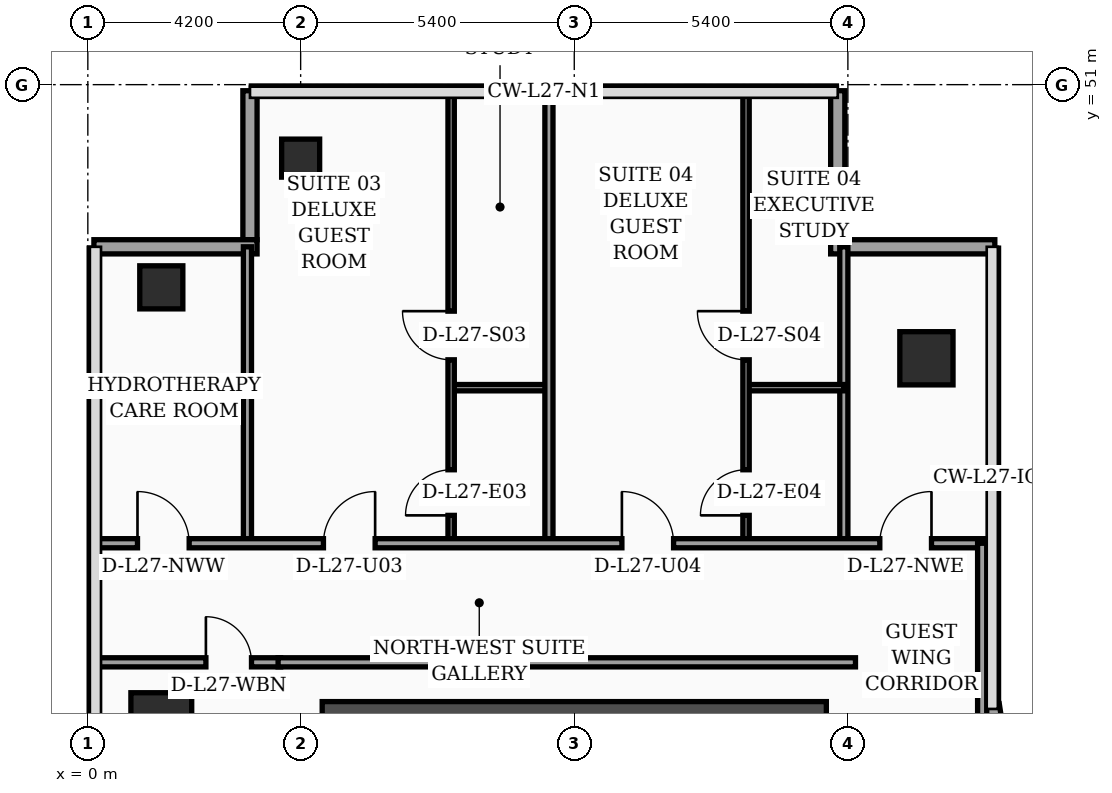
"""IFC4 building model, lengths in metres.
Left out: names, types, materials, properties, quantities, classifications, styles, units other than length and angle.
Written with IfcOpenShell. Run it as: python <this file> out.ifc"""

import sys

from ifc_helpers import new_model, si_unit, direction, frame, frame_2d, origin, origin_2d, place, context, subcontext, project, spatial, rectangle, hollow_rectangle, extrude, element, fill, save


model = new_model("IFC4")
c1 = context("Model", 3, precision=1e-05, world=origin(), true_north=direction((0.0, 1.0)))
c2 = subcontext(c1, "Body", "Model", "MODEL_VIEW")
j1 = project(units=[si_unit("LENGTHUNIT", "METRE"), si_unit("PLANEANGLEUNIT", "RADIAN")], contexts=[c1])
p1 = place(None, origin())
s1 = spatial("IfcSite", under=j1, at=p1, CompositionType="ELEMENT")
p2 = place(p1, origin())
s2 = spatial("IfcBuilding", under=s1, at=p2, CompositionType="ELEMENT")
p3 = place(p2, frame((0.0, 0.0, 112.6)))
s3 = spatial("IfcBuildingStorey", under=s2, at=p3, CompositionType="ELEMENT", Elevation=112.6)
p4 = place(p3, frame((4.625, 38.4, 0.0), z_axis=(0.0, 0.0, 1.0), x_axis=(1.0, 0.0, 0.0)))
e1 = element("IfcWall", 1, at=p4, inside=s3, PredefinedType="SHEAR", context=c2, shape_type="SweptSolid", body=[
    extrude(rectangle(XDim=9.95, YDim=0.85, at=frame_2d((4.975, 0.0))), origin(), (0.0, 0.0, 1.0), 3.56),
])
p5 = place(p3, frame((1.45, 38.4, 0.0), z_axis=(0.0, 0.0, 1.0), x_axis=(1.0, 0.0, 0.0)))
e2 = element("IfcColumn", 2, at=p5, inside=s3, PredefinedType="COLUMN", context=c2, shape_type="SweptSolid", body=[
    extrude(rectangle(XDim=1.2, YDim=1.2, at=origin_2d()), origin(), (0.0, 0.0, 1.0), 3.56),
])
p6 = place(p3, frame((1.45, 47.0, 0.0), z_axis=(0.0, 0.0, 1.0), x_axis=(1.0, 0.0, 0.0)))
e3 = element("IfcColumn", 3, at=p6, inside=s3, PredefinedType="COLUMN", context=c2, shape_type="SweptSolid", body=[
    extrude(hollow_rectangle(XDim=0.85, YDim=0.85, WallThickness=0.036, at=origin_2d()), origin(), (0.0, 0.0, 1.0), 3.56),
])
p7 = place(p3, frame((4.2, 49.55, 0.0), z_axis=(0.0, 0.0, 1.0), x_axis=(1.0, 0.0, 0.0)))
e4 = element("IfcColumn", 4, at=p7, inside=s3, PredefinedType="COLUMN", context=c2, shape_type="SweptSolid", body=[
    extrude(hollow_rectangle(XDim=0.75, YDim=0.75, WallThickness=0.032, at=origin_2d()), origin(), (0.0, 0.0, 1.0), 3.56),
])
p8 = place(p3, frame((16.55, 45.6, 0.0), z_axis=(0.0, 0.0, 1.0), x_axis=(1.0, 0.0, 0.0)))
e5 = element("IfcColumn", 5, at=p8, inside=s3, PredefinedType="COLUMN", context=c2, shape_type="SweptSolid", body=[
    extrude(rectangle(XDim=1.05, YDim=1.05, at=origin_2d()), origin(), (0.0, 0.0, 1.0), 3.56),
])
p9 = place(p3, frame((17.962, 38.03, 0.0), z_axis=(0.0, 0.0, 1.0), x_axis=(-0.15141125477, 0.988470855377, 0.0)))
e6 = element("IfcWall", 6, at=p9, inside=s3, PredefinedType="SOLIDWALL", context=c2, shape_type="SweptSolid", body=[
    extrude(rectangle(XDim=0.739, YDim=0.28, at=frame_2d((0.369, 0.0))), origin(), (0.0, 0.0, 1.0), 3.56),
])
p10 = place(p3, frame((17.9, 47.8, 0.0), z_axis=(0.0, 0.0, 1.0), x_axis=(-1.0, 0.0, 0.0)))
e7 = element("IfcWall", 7, at=p10, inside=s3, PredefinedType="SOLIDWALL", context=c2, shape_type="SweptSolid", body=[
    extrude(rectangle(XDim=3.24, YDim=0.28, at=frame_2d((1.62, 0.0))), origin(), (0.0, 0.0, 1.0), 3.56),
])
p11 = place(p3, frame((14.8, 47.94, 0.0), z_axis=(0.0, 0.0, 1.0), x_axis=(0.0, 1.0, 0.0)))
e8 = element("IfcWall", 8, at=p11, inside=s3, PredefinedType="SOLIDWALL", context=c2, shape_type="SweptSolid", body=[
    extrude(rectangle(XDim=2.94, YDim=0.28, at=frame_2d((1.47, 0.0))), origin(), (0.0, 0.0, 1.0), 3.56),
])
p12 = place(p3, frame((3.2, 50.88, 0.0), z_axis=(0.0, 0.0, 1.0), x_axis=(0.0, -1.0, 0.0)))
e9 = element("IfcWall", 9, at=p12, inside=s3, PredefinedType="SOLIDWALL", context=c2, shape_type="SweptSolid", body=[
    extrude(rectangle(XDim=2.94, YDim=0.28, at=frame_2d((1.47, 0.0))), origin(), (0.0, 0.0, 1.0), 3.04),
])
p13 = place(p3, frame((3.34, 47.8, 0.0), z_axis=(0.0, 0.0, 1.0), x_axis=(-1.0, 0.0, 0.0)))
e10 = element("IfcWall", 10, at=p13, inside=s3, PredefinedType="SOLIDWALL", context=c2, shape_type="SweptSolid", body=[
    extrude(rectangle(XDim=3.22, YDim=0.28, at=frame_2d((1.61, 0.0))), origin(), (0.0, 0.0, 1.0), 3.04),
])
p14 = place(p3, frame((0.08, 39.6, 0.0), z_axis=(0.0, 0.0, 1.0), x_axis=(1.0, 0.0, 0.0)))
e11 = element("IfcWall", 11, at=p14, inside=s3, PredefinedType="PARTITIONING", context=c2, shape_type="SweptSolid", body=[
    extrude(rectangle(XDim=3.725, YDim=0.18, at=frame_2d((1.862, 0.0))), origin(), (0.0, 0.0, 1.0), 2.84),
])
p15 = place(p14, frame((2.25, 0.0, 0.0)))
e12 = element("IfcOpeningElement", 12, at=p15, cuts=e11, PredefinedType="OPENING", context=c2, shape_type="SweptSolid", body=[
    extrude(rectangle(XDim=0.9, YDim=2.15, at=frame_2d((0.45, 1.075))), frame((0.0, 0.1, 0.0), z_axis=(0.0, -1.0, 0.0), x_axis=(1.0, 0.0, 0.0)), (0.0, 0.0, 1.0), 0.2),
])
p16 = place(p3, frame((3.15, 41.95, 0.0), z_axis=(0.0, 0.0, 1.0), x_axis=(0.0, 1.0, 0.0)))
e13 = element("IfcWall", 13, at=p16, inside=s3, PredefinedType="PARTITIONING", context=c2, shape_type="SweptSolid", body=[
    extrude(rectangle(XDim=5.85, YDim=0.16, at=frame_2d((2.925, 0.0))), origin(), (0.0, 0.0, 1.0), 3.14),
])
p17 = place(p3, frame((14.92, 41.95, 0.0), z_axis=(0.0, 0.0, 1.0), x_axis=(0.0, 1.0, 0.0)))
e14 = element("IfcWall", 14, at=p17, inside=s3, PredefinedType="PARTITIONING", context=c2, shape_type="SweptSolid", body=[
    extrude(rectangle(XDim=5.85, YDim=0.16, at=frame_2d((2.925, 0.0))), origin(), (0.0, 0.0, 1.0), 3.04),
])
p18 = place(p3, frame((7.17, 45.02, 0.0), z_axis=(0.0, 0.0, 1.0), x_axis=(1.0, 0.0, 0.0)))
e15 = element("IfcWall", 15, at=p18, inside=s3, PredefinedType="PARTITIONING", context=c2, shape_type="SweptSolid", body=[
    extrude(rectangle(XDim=1.93, YDim=0.125, at=frame_2d((0.965, 0.0))), origin(), (0.0, 0.0, 1.0), 3.56),
])
p19 = place(p3, frame((7.17, 41.95, 0.0), z_axis=(0.0, 0.0, 1.0), x_axis=(0.0, 1.0, 0.0)))
e16 = element("IfcWall", 16, at=p19, inside=s3, PredefinedType="PARTITIONING", context=c2, shape_type="SweptSolid", body=[
    extrude(rectangle(XDim=8.99, YDim=0.125, at=frame_2d((4.495, 0.0))), origin(), (0.0, 0.0, 1.0), 3.04),
])
p20 = place(p19, frame((0.55, 0.0, 0.0)))
e17 = element("IfcOpeningElement", 17, at=p20, cuts=e16, PredefinedType="OPENING", context=c2, shape_type="SweptSolid", body=[
    extrude(rectangle(XDim=0.9, YDim=2.15, at=frame_2d((0.45, 1.075))), frame((0.0, 0.073, 0.0), z_axis=(0.0, -1.0, 0.0), x_axis=(1.0, 0.0, 0.0)), (0.0, 0.0, 1.0), 0.145),
])
p21 = place(p19, frame((3.62, 0.0, 0.0)))
e18 = element("IfcOpeningElement", 18, at=p21, cuts=e16, PredefinedType="OPENING", context=c2, shape_type="SweptSolid", body=[
    extrude(rectangle(XDim=0.96, YDim=2.2, at=frame_2d((0.48, 1.1))), frame((0.0, 0.073, 0.0), z_axis=(0.0, -1.0, 0.0), x_axis=(1.0, 0.0, 0.0)), (0.0, 0.0, 1.0), 0.145),
])
p22 = place(p3, frame((12.99, 45.02, 0.0), z_axis=(0.0, 0.0, 1.0), x_axis=(1.0, 0.0, 0.0)))
e19 = element("IfcWall", 19, at=p22, inside=s3, PredefinedType="PARTITIONING", context=c2, shape_type="SweptSolid", body=[
    extrude(rectangle(XDim=1.93, YDim=0.125, at=frame_2d((0.965, 0.0))), origin(), (0.0, 0.0, 1.0), 3.56),
])
p23 = place(p3, frame((12.99, 41.95, 0.0), z_axis=(0.0, 0.0, 1.0), x_axis=(0.0, 1.0, 0.0)))
e20 = element("IfcWall", 20, at=p23, inside=s3, PredefinedType="PARTITIONING", context=c2, shape_type="SweptSolid", body=[
    extrude(rectangle(XDim=8.99, YDim=0.125, at=frame_2d((4.495, 0.0))), origin(), (0.0, 0.0, 1.0), 3.04),
])
p24 = place(p23, frame((0.55, 0.0, 0.0)))
e21 = element("IfcOpeningElement", 21, at=p24, cuts=e20, PredefinedType="OPENING", context=c2, shape_type="SweptSolid", body=[
    extrude(rectangle(XDim=0.9, YDim=2.15, at=frame_2d((0.45, 1.075))), frame((0.0, 0.073, 0.0), z_axis=(0.0, -1.0, 0.0), x_axis=(1.0, 0.0, 0.0)), (0.0, 0.0, 1.0), 0.145),
])
p25 = place(p23, frame((3.62, 0.0, 0.0)))
e22 = element("IfcOpeningElement", 22, at=p25, cuts=e20, PredefinedType="OPENING", context=c2, shape_type="SweptSolid", body=[
    extrude(rectangle(XDim=0.96, YDim=2.2, at=frame_2d((0.48, 1.1))), frame((0.0, 0.073, 0.0), z_axis=(0.0, -1.0, 0.0), x_axis=(1.0, 0.0, 0.0)), (0.0, 0.0, 1.0), 0.145),
])
p26 = place(p3, frame((9.1, 41.95, 0.0), z_axis=(0.0, 0.0, 1.0), x_axis=(0.0, 1.0, 0.0)))
e23 = element("IfcWall", 23, at=p26, inside=s3, PredefinedType="PARTITIONING", context=c2, shape_type="SweptSolid", body=[
    extrude(rectangle(XDim=8.99, YDim=0.16, at=frame_2d((4.495, 0.0))), origin(), (0.0, 0.0, 1.0), 3.04),
])
p27 = place(p3, frame((0.08, 41.95, 0.0), z_axis=(0.0, 0.0, 1.0), x_axis=(1.0, 0.0, 0.0)))
e24 = element("IfcWall", 24, at=p27, inside=s3, PredefinedType="PARTITIONING", context=c2, shape_type="SweptSolid", body=[
    extrude(rectangle(XDim=17.77, YDim=0.18, at=frame_2d((8.885, 0.0))), origin(), (0.0, 0.0, 1.0), 2.84),
])
p28 = place(p27, frame((0.9, 0.0, 0.0)))
e25 = element("IfcOpeningElement", 25, at=p28, cuts=e24, PredefinedType="OPENING", context=c2, shape_type="SweptSolid", body=[
    extrude(rectangle(XDim=1.02, YDim=2.2, at=frame_2d((0.51, 1.1))), frame((0.0, 0.1, 0.0), z_axis=(0.0, -1.0, 0.0), x_axis=(1.0, 0.0, 0.0)), (0.0, 0.0, 1.0), 0.2),
])
p29 = place(p27, frame((4.57, 0.0, 0.0)))
e26 = element("IfcOpeningElement", 26, at=p29, cuts=e24, PredefinedType="OPENING", context=c2, shape_type="SweptSolid", body=[
    extrude(rectangle(XDim=1.02, YDim=2.2, at=frame_2d((0.51, 1.1))), frame((0.0, 0.1, 0.0), z_axis=(0.0, -1.0, 0.0), x_axis=(1.0, 0.0, 0.0)), (0.0, 0.0, 1.0), 0.2),
])
p30 = place(p27, frame((10.46, 0.0, 0.0)))
e27 = element("IfcOpeningElement", 27, at=p30, cuts=e24, PredefinedType="OPENING", context=c2, shape_type="SweptSolid", body=[
    extrude(rectangle(XDim=1.02, YDim=2.2, at=frame_2d((0.51, 1.1))), frame((0.0, 0.1, 0.0), z_axis=(0.0, -1.0, 0.0), x_axis=(1.0, 0.0, 0.0)), (0.0, 0.0, 1.0), 0.2),
])
p31 = place(p27, frame((15.55, 0.0, 0.0)))
e28 = element("IfcOpeningElement", 28, at=p31, cuts=e24, PredefinedType="OPENING", context=c2, shape_type="SweptSolid", body=[
    extrude(rectangle(XDim=1.02, YDim=2.2, at=frame_2d((0.51, 1.1))), frame((0.0, 0.1, 0.0), z_axis=(0.0, -1.0, 0.0), x_axis=(1.0, 0.0, 0.0)), (0.0, 0.0, 1.0), 0.2),
])
p32 = place(p3, frame((17.65, 24.3, 0.0), z_axis=(0.0, 0.0, 1.0), x_axis=(0.0, 1.0, 0.0)))
e29 = element("IfcWall", 29, at=p32, inside=s3, PredefinedType="PARTITIONING", context=c2, shape_type="SweptSolid", body=[
    extrude(rectangle(XDim=17.65, YDim=0.18, at=frame_2d((8.825, 0.0))), origin(), (0.0, 0.0, 1.0), 2.84),
])
p33 = place(p3, frame((3.755, 39.6, 0.0), z_axis=(0.0, 0.0, 1.0), x_axis=(1.0, 0.0, 0.0)))
e30 = element("IfcWall", 30, at=p33, inside=s3, PredefinedType="PARTITIONING", context=c2, shape_type="SweptSolid", body=[
    extrude(rectangle(XDim=11.395, YDim=0.18, at=frame_2d((5.698, 0.0))), origin(), (0.0, 0.0, 1.0), 2.84),
])
p34 = place(p15, origin())
e31 = element("IfcDoor", 31, at=p34, inside=s3, OperationType="SINGLE_SWING_LEFT", PredefinedType="DOOR", context=c2, shape_type="SweptSolid", body=[
    extrude(rectangle(XDim=0.9, YDim=2.15, at=frame_2d((0.45, 1.075))), frame((0.0, 0.025, 0.0), z_axis=(0.0, -1.0, 0.0), x_axis=(1.0, 0.0, 0.0)), (0.0, 0.0, 1.0), 0.05),
])
fill(e12, e31)
p35 = place(p20, origin())
e32 = element("IfcDoor", 32, at=p35, inside=s3, OperationType="SINGLE_SWING_LEFT", PredefinedType="DOOR", context=c2, shape_type="SweptSolid", body=[
    extrude(rectangle(XDim=0.9, YDim=2.15, at=frame_2d((0.45, 1.075))), frame((0.0, 0.025, 0.0), z_axis=(0.0, -1.0, 0.0), x_axis=(1.0, 0.0, 0.0)), (0.0, 0.0, 1.0), 0.05),
])
fill(e17, e32)
p36 = place(p21, origin())
e33 = element("IfcDoor", 33, at=p36, inside=s3, OperationType="SINGLE_SWING_RIGHT", PredefinedType="DOOR", context=c2, shape_type="SweptSolid", body=[
    extrude(rectangle(XDim=0.96, YDim=2.2, at=frame_2d((0.48, 1.1))), frame((0.0, 0.025, 0.0), z_axis=(0.0, -1.0, 0.0), x_axis=(1.0, 0.0, 0.0)), (0.0, 0.0, 1.0), 0.05),
])
fill(e18, e33)
p37 = place(p24, origin())
e34 = element("IfcDoor", 34, at=p37, inside=s3, OperationType="SINGLE_SWING_LEFT", PredefinedType="DOOR", context=c2, shape_type="SweptSolid", body=[
    extrude(rectangle(XDim=0.9, YDim=2.15, at=frame_2d((0.45, 1.075))), frame((0.0, 0.025, 0.0), z_axis=(0.0, -1.0, 0.0), x_axis=(1.0, 0.0, 0.0)), (0.0, 0.0, 1.0), 0.05),
])
fill(e21, e34)
p38 = place(p25, origin())
e35 = element("IfcDoor", 35, at=p38, inside=s3, OperationType="SINGLE_SWING_RIGHT", PredefinedType="DOOR", context=c2, shape_type="SweptSolid", body=[
    extrude(rectangle(XDim=0.96, YDim=2.2, at=frame_2d((0.48, 1.1))), frame((0.0, 0.025, 0.0), z_axis=(0.0, -1.0, 0.0), x_axis=(1.0, 0.0, 0.0)), (0.0, 0.0, 1.0), 0.05),
])
fill(e22, e35)
p39 = place(p28, origin())
e36 = element("IfcDoor", 36, at=p39, inside=s3, OperationType="SINGLE_SWING_LEFT", PredefinedType="DOOR", context=c2, shape_type="SweptSolid", body=[
    extrude(rectangle(XDim=1.02, YDim=2.2, at=frame_2d((0.51, 1.1))), frame((0.0, 0.025, 0.0), z_axis=(0.0, -1.0, 0.0), x_axis=(1.0, 0.0, 0.0)), (0.0, 0.0, 1.0), 0.05),
])
fill(e25, e36)
p40 = place(p29, origin())
e37 = element("IfcDoor", 37, at=p40, inside=s3, OperationType="SINGLE_SWING_RIGHT", PredefinedType="DOOR", context=c2, shape_type="SweptSolid", body=[
    extrude(rectangle(XDim=1.02, YDim=2.2, at=frame_2d((0.51, 1.1))), frame((0.0, 0.025, 0.0), z_axis=(0.0, -1.0, 0.0), x_axis=(1.0, 0.0, 0.0)), (0.0, 0.0, 1.0), 0.05),
])
fill(e26, e37)
p41 = place(p30, origin())
e38 = element("IfcDoor", 38, at=p41, inside=s3, OperationType="SINGLE_SWING_LEFT", PredefinedType="DOOR", context=c2, shape_type="SweptSolid", body=[
    extrude(rectangle(XDim=1.02, YDim=2.2, at=frame_2d((0.51, 1.1))), frame((0.0, 0.025, 0.0), z_axis=(0.0, -1.0, 0.0), x_axis=(1.0, 0.0, 0.0)), (0.0, 0.0, 1.0), 0.05),
])
fill(e27, e38)
p42 = place(p31, origin())
e39 = element("IfcDoor", 39, at=p42, inside=s3, OperationType="SINGLE_SWING_RIGHT", PredefinedType="DOOR", context=c2, shape_type="SweptSolid", body=[
    extrude(rectangle(XDim=1.02, YDim=2.2, at=frame_2d((0.51, 1.1))), frame((0.0, 0.025, 0.0), z_axis=(0.0, -1.0, 0.0), x_axis=(1.0, 0.0, 0.0)), (0.0, 0.0, 1.0), 0.05),
])
fill(e28, e39)
save(model, sys.argv[1])
